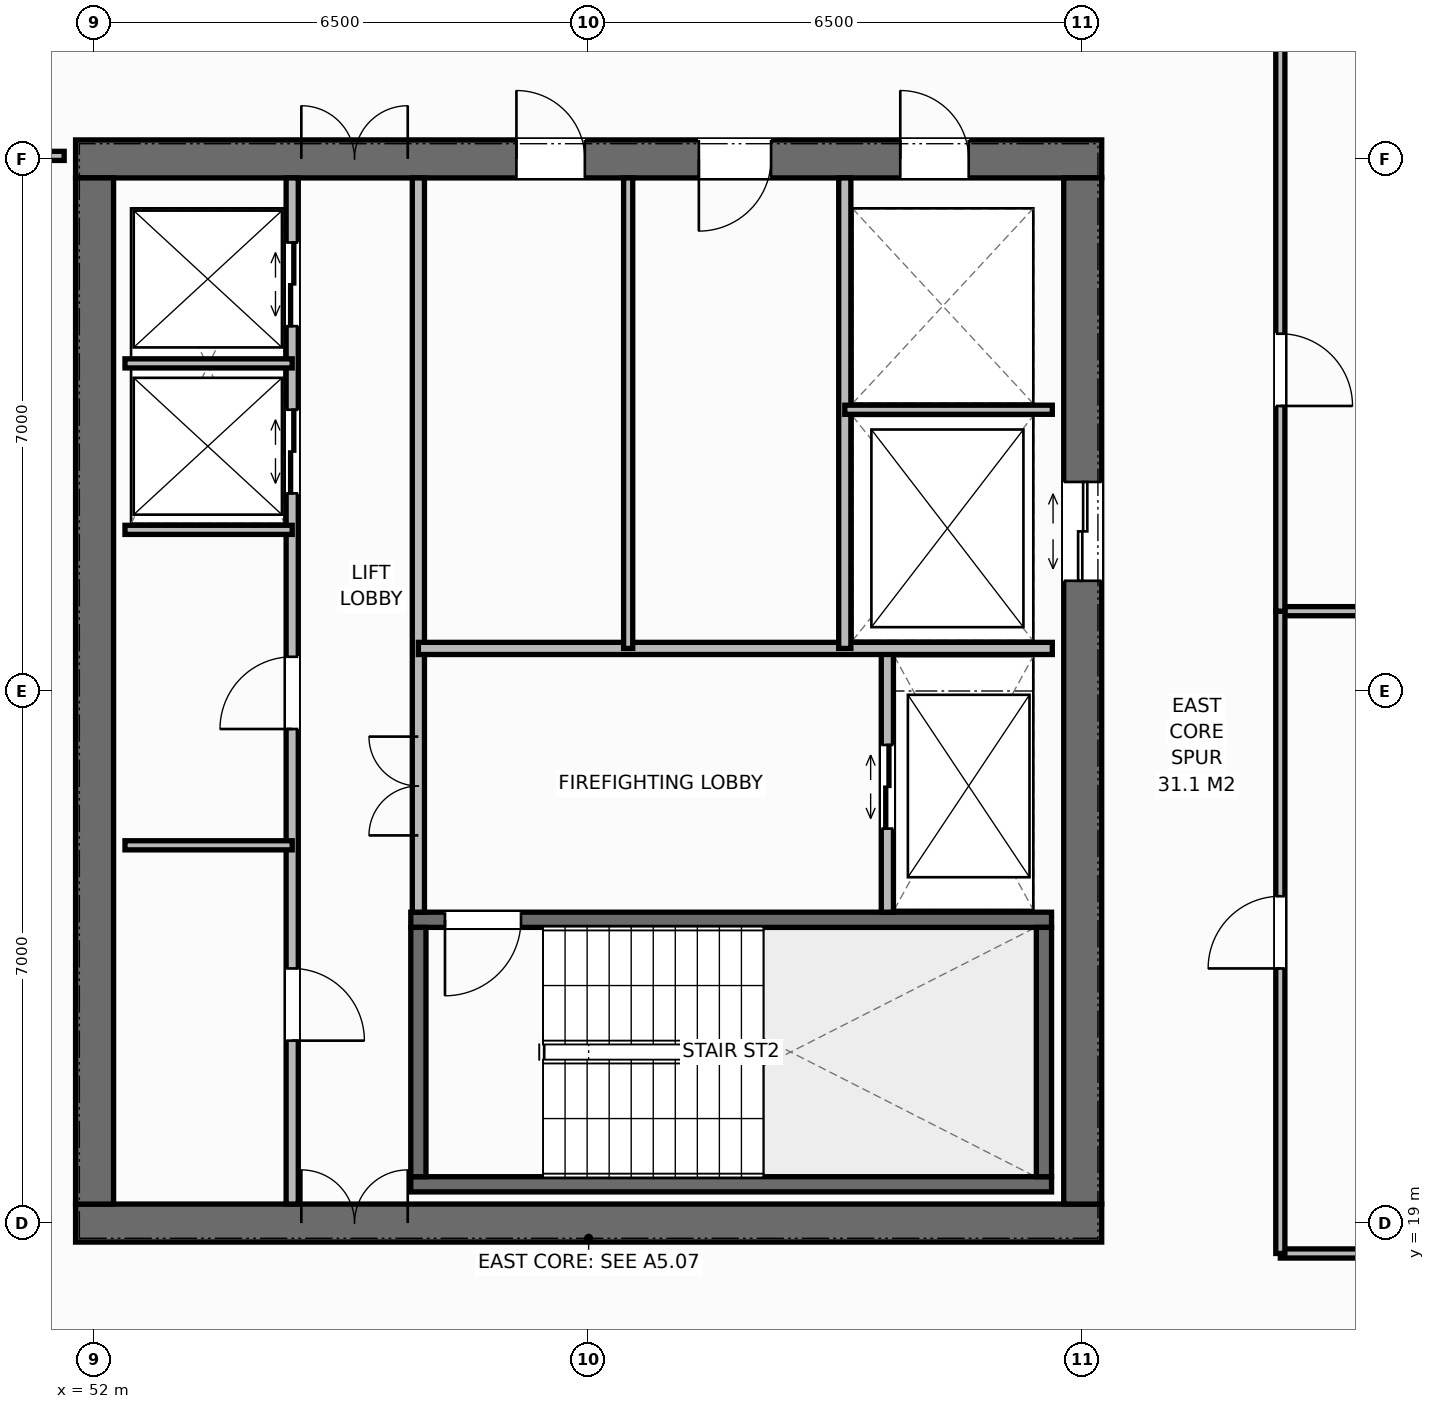
"""IFC4 building model, lengths in metres.
Left out: names, types, materials, properties, quantities, classifications, styles, units other than length and angle.
Written with IfcOpenShell. Run it as: python <this file> out.ifc"""

import sys

from ifc_helpers import new_model, si_unit, direction, frame, frame_2d, origin, place, context, subcontext, project, spatial, rectangle, extrude, element, fill, save


model = new_model("IFC4")
c1 = context("Model", 3, precision=1e-05, world=origin(), true_north=direction((0.0, 1.0)))
c2 = subcontext(c1, "Body", "Model", "MODEL_VIEW")
j1 = project(units=[si_unit("LENGTHUNIT", "METRE"), si_unit("PLANEANGLEUNIT", "RADIAN")], contexts=[c1])
p1 = place(None, origin())
s1 = spatial("IfcSite", under=j1, at=p1, CompositionType="ELEMENT")
p2 = place(p1, origin())
s2 = spatial("IfcBuilding", under=s1, at=p2, CompositionType="ELEMENT")
p3 = place(p2, frame((0.0, 0.0, 274.6)))
s3 = spatial("IfcBuildingStorey", under=s2, at=p3, CompositionType="ELEMENT", Elevation=274.6)
p4 = place(p3, frame((51.75, 19.0, 0.0), z_axis=(0.0, 0.0, 1.0), x_axis=(1.0, 0.0, 0.0)))
e1 = element("IfcWall", 1, at=p4, inside=s3, PredefinedType="SHEAR", context=c2, shape_type="SweptSolid", body=[
    extrude(rectangle(XDim=13.5, YDim=0.5, at=frame_2d((6.75, 0.0))), origin(), (0.0, 0.0, 1.0), 3.8),
])
p5 = place(p4, frame((2.97, 0.0, 0.0)))
e2 = element("IfcOpeningElement", 2, at=p5, cuts=e1, PredefinedType="OPENING", context=c2, shape_type="SweptSolid", body=[
    extrude(rectangle(XDim=1.4, YDim=2.2, at=frame_2d((0.7, 1.1))), frame((0.0, 0.26, 0.0), z_axis=(0.0, -1.0, 0.0), x_axis=(1.0, 0.0, 0.0)), (0.0, 0.0, 1.0), 0.52),
])
p6 = place(p3, frame((51.75, 33.0, 0.0), z_axis=(0.0, 0.0, 1.0), x_axis=(1.0, 0.0, 0.0)))
e3 = element("IfcWall", 3, at=p6, inside=s3, PredefinedType="SHEAR", context=c2, shape_type="SweptSolid", body=[
    extrude(rectangle(XDim=13.5, YDim=0.5, at=frame_2d((6.75, 0.0))), origin(), (0.0, 0.0, 1.0), 3.8),
])
p7 = place(p6, frame((2.97, 0.0, 0.0)))
e4 = element("IfcOpeningElement", 4, at=p7, cuts=e3, PredefinedType="OPENING", context=c2, shape_type="SweptSolid", body=[
    extrude(rectangle(XDim=1.4, YDim=2.2, at=frame_2d((0.7, 1.1))), frame((0.0, 0.26, 0.0), z_axis=(0.0, -1.0, 0.0), x_axis=(1.0, 0.0, 0.0)), (0.0, 0.0, 1.0), 0.52),
])
p8 = place(p6, frame((10.85, 0.0, 0.0)))
e5 = element("IfcOpeningElement", 5, at=p8, cuts=e3, PredefinedType="OPENING", context=c2, shape_type="SweptSolid", body=[
    extrude(rectangle(XDim=0.9, YDim=2.15, at=frame_2d((0.45, 1.075))), frame((0.0, 0.26, 0.0), z_axis=(0.0, -1.0, 0.0), x_axis=(1.0, 0.0, 0.0)), (0.0, 0.0, 1.0), 0.52),
])
p9 = place(p6, frame((5.8, 0.0, 0.0)))
e6 = element("IfcOpeningElement", 6, at=p9, cuts=e3, PredefinedType="OPENING", context=c2, shape_type="SweptSolid", body=[
    extrude(rectangle(XDim=0.9, YDim=2.15, at=frame_2d((0.45, 1.075))), frame((0.0, 0.26, 0.0), z_axis=(0.0, -1.0, 0.0), x_axis=(1.0, 0.0, 0.0)), (0.0, 0.0, 1.0), 0.52),
])
p10 = place(p6, frame((8.2, 0.0, 0.0)))
e7 = element("IfcOpeningElement", 7, at=p10, cuts=e3, PredefinedType="OPENING", context=c2, shape_type="SweptSolid", body=[
    extrude(rectangle(XDim=0.95, YDim=2.15, at=frame_2d((0.475, 1.075))), frame((0.0, 0.26, 0.0), z_axis=(0.0, -1.0, 0.0), x_axis=(1.0, 0.0, 0.0)), (0.0, 0.0, 1.0), 0.52),
])
p11 = place(p3, frame((52.0, 19.25, 0.0), z_axis=(0.0, 0.0, 1.0), x_axis=(0.0, 1.0, 0.0)))
e8 = element("IfcWall", 8, at=p11, inside=s3, PredefinedType="SHEAR", context=c2, shape_type="SweptSolid", body=[
    extrude(rectangle(XDim=13.5, YDim=0.5, at=frame_2d((6.75, 0.0))), origin(), (0.0, 0.0, 1.0), 3.8),
])
p12 = place(p3, frame((65.0, 19.25, 0.0), z_axis=(0.0, 0.0, 1.0), x_axis=(0.0, 1.0, 0.0)))
e9 = element("IfcWall", 9, at=p12, inside=s3, PredefinedType="SHEAR", context=c2, shape_type="SweptSolid", body=[
    extrude(rectangle(XDim=13.5, YDim=0.5, at=frame_2d((6.75, 0.0))), origin(), (0.0, 0.0, 1.0), 3.8),
])
p13 = place(p12, frame((8.2, 0.0, 0.0)))
e10 = element("IfcOpeningElement", 10, at=p13, cuts=e9, PredefinedType="OPENING", context=c2, shape_type="SweptSolid", body=[
    extrude(rectangle(XDim=1.3, YDim=2.2, at=frame_2d((0.65, 1.1))), frame((0.0, 0.26, 0.0), z_axis=(0.0, -1.0, 0.0), x_axis=(1.0, 0.0, 0.0)), (0.0, 0.0, 1.0), 0.52),
])
p14 = place(p3, frame((56.16, 19.51, 0.0), z_axis=(0.0, 0.0, 1.0), x_axis=(1.0, 0.0, 0.0)))
e11 = element("IfcWall", 11, at=p14, inside=s3, PredefinedType="SHEAR", context=c2, shape_type="SweptSolid", body=[
    extrude(rectangle(XDim=8.43, YDim=0.2, at=frame_2d((4.215, 0.0))), origin(), (0.0, 0.0, 1.0), 3.8),
])
p15 = place(p3, frame((56.16, 22.99, 0.0), z_axis=(0.0, 0.0, 1.0), x_axis=(1.0, 0.0, 0.0)))
e12 = element("IfcWall", 12, at=p15, inside=s3, PredefinedType="SHEAR", context=c2, shape_type="SweptSolid", body=[
    extrude(rectangle(XDim=8.43, YDim=0.2, at=frame_2d((4.215, 0.0))), origin(), (0.0, 0.0, 1.0), 3.8),
])
p16 = place(p15, frame((0.45, 0.0, 0.0)))
e13 = element("IfcOpeningElement", 13, at=p16, cuts=e12, PredefinedType="OPENING", context=c2, shape_type="SweptSolid", body=[
    extrude(rectangle(XDim=1.0, YDim=2.15, at=frame_2d((0.5, 1.075))), frame((0.0, 0.11, 0.0), z_axis=(0.0, -1.0, 0.0), x_axis=(1.0, 0.0, 0.0)), (0.0, 0.0, 1.0), 0.22),
])
for number, where, z_axis, x_axis in (
    (14, (56.26, 19.61, 0.0), (0.0, 0.0, 1.0), (0.0, 1.0, 0.0)),
    (15, (64.49, 19.61, 0.0), (0.0, 0.0, 1.0), (0.0, 1.0, 0.0)),
):
    element("IfcWall", number, at=place(p3, frame(where, z_axis=z_axis, x_axis=x_axis)), inside=s3, PredefinedType="SHEAR", context=c2, shape_type="SweptSolid", body=[
        extrude(rectangle(XDim=3.28, YDim=0.2, at=frame_2d((1.64, 0.0))), origin(), (0.0, 0.0, 1.0), 3.8),
    ])
p17 = place(p3, frame((54.6, 19.25, 0.0), z_axis=(0.0, 0.0, 1.0), x_axis=(0.0, 1.0, 0.0)))
e16 = element("IfcWall", 16, at=p17, inside=s3, PredefinedType="STANDARD", context=c2, shape_type="SweptSolid", body=[
    extrude(rectangle(XDim=13.5, YDim=0.16, at=frame_2d((6.75, 0.0))), origin(), (0.0, 0.0, 1.0), 3.588),
])
p18 = place(p17, frame((2.15, 0.0, 0.0)))
e17 = element("IfcOpeningElement", 17, at=p18, cuts=e16, PredefinedType="OPENING", context=c2, shape_type="SweptSolid", body=[
    extrude(rectangle(XDim=0.95, YDim=2.15, at=frame_2d((0.475, 1.075))), frame((0.0, 0.09, 0.0), z_axis=(0.0, -1.0, 0.0), x_axis=(1.0, 0.0, 0.0)), (0.0, 0.0, 1.0), 0.18),
])
p19 = place(p17, frame((6.25, 0.0, 0.0)))
e18 = element("IfcOpeningElement", 18, at=p19, cuts=e16, PredefinedType="OPENING", context=c2, shape_type="SweptSolid", body=[
    extrude(rectangle(XDim=0.95, YDim=2.15, at=frame_2d((0.475, 1.075))), frame((0.0, 0.09, 0.0), z_axis=(0.0, -1.0, 0.0), x_axis=(1.0, 0.0, 0.0)), (0.0, 0.0, 1.0), 0.18),
])
p20 = place(p17, frame((9.35, 0.0, 0.0)))
e19 = element("IfcOpeningElement", 19, at=p20, cuts=e16, PredefinedType="OPENING", context=c2, shape_type="SweptSolid", body=[
    extrude(rectangle(XDim=1.1, YDim=2.2, at=frame_2d((0.55, 1.1))), frame((0.0, 0.09, 0.0), z_axis=(0.0, -1.0, 0.0), x_axis=(1.0, 0.0, 0.0)), (0.0, 0.0, 1.0), 0.18),
])
p21 = place(p17, frame((11.55, 0.0, 0.0)))
e20 = element("IfcOpeningElement", 20, at=p21, cuts=e16, PredefinedType="OPENING", context=c2, shape_type="SweptSolid", body=[
    extrude(rectangle(XDim=1.1, YDim=2.2, at=frame_2d((0.55, 1.1))), frame((0.0, 0.09, 0.0), z_axis=(0.0, -1.0, 0.0), x_axis=(1.0, 0.0, 0.0)), (0.0, 0.0, 1.0), 0.18),
])
p22 = place(p3, frame((56.26, 23.09, 0.0), z_axis=(0.0, 0.0, 1.0), x_axis=(0.0, 1.0, 0.0)))
e21 = element("IfcWall", 21, at=p22, inside=s3, PredefinedType="STANDARD", context=c2, shape_type="SweptSolid", body=[
    extrude(rectangle(XDim=9.66, YDim=0.16, at=frame_2d((4.83, 0.0))), origin(), (0.0, 0.0, 1.0), 3.588),
])
p23 = place(p22, frame((1.01, 0.0, 0.0)))
e22 = element("IfcOpeningElement", 22, at=p23, cuts=e21, PredefinedType="OPENING", context=c2, shape_type="SweptSolid", body=[
    extrude(rectangle(XDim=1.3, YDim=2.2, at=frame_2d((0.65, 1.1))), frame((0.0, 0.09, 0.0), z_axis=(0.0, -1.0, 0.0), x_axis=(1.0, 0.0, 0.0)), (0.0, 0.0, 1.0), 0.18),
])
for number, where, z_axis, x_axis in (
    (23, (52.4, 23.97, 0.0), (0.0, 0.0, 1.0), (1.0, 0.0, 0.0)),
    (24, (52.4, 28.12, 0.0), (0.0, 0.0, 1.0), (1.0, 0.0, 0.0)),
    (25, (52.4, 30.31, 0.0), (0.0, 0.0, 1.0), (1.0, 0.0, 0.0)),
):
    element("IfcWall", number, at=place(p3, frame(where, z_axis=z_axis, x_axis=x_axis)), inside=s3, PredefinedType="PARTITIONING", context=c2, shape_type="SweptSolid", body=[
        extrude(rectangle(XDim=2.2, YDim=0.12, at=frame_2d((1.1, 0.0))), origin(), (0.0, 0.0, 1.0), 3.588),
    ])
p24 = place(p3, frame((62.43, 23.09, 0.0), z_axis=(0.0, 0.0, 1.0), x_axis=(0.0, 1.0, 0.0)))
e26 = element("IfcWall", 26, at=p24, inside=s3, PredefinedType="STANDARD", context=c2, shape_type="SweptSolid", body=[
    extrude(rectangle(XDim=3.47, YDim=0.16, at=frame_2d((1.735, 0.0))), origin(), (0.0, 0.0, 1.0), 3.588),
])
p25 = place(p24, frame((1.1, 0.0, 0.0)))
e27 = element("IfcOpeningElement", 27, at=p25, cuts=e26, PredefinedType="OPENING", context=c2, shape_type="SweptSolid", body=[
    extrude(rectangle(XDim=1.1, YDim=2.2, at=frame_2d((0.55, 1.1))), frame((0.0, 0.09, 0.0), z_axis=(0.0, -1.0, 0.0), x_axis=(1.0, 0.0, 0.0)), (0.0, 0.0, 1.0), 0.18),
])
p26 = place(p3, frame((56.26, 26.56, 0.0), z_axis=(0.0, 0.0, 1.0), x_axis=(1.0, 0.0, 0.0)))
e28 = element("IfcWall", 28, at=p26, inside=s3, PredefinedType="STANDARD", context=c2, shape_type="SweptSolid", body=[
    extrude(rectangle(XDim=8.34, YDim=0.16, at=frame_2d((4.17, 0.0))), origin(), (0.0, 0.0, 1.0), 3.588),
])
p27 = place(p3, frame((61.87, 26.56, 0.0), z_axis=(0.0, 0.0, 1.0), x_axis=(0.0, 1.0, 0.0)))
e29 = element("IfcWall", 29, at=p27, inside=s3, PredefinedType="STANDARD", context=c2, shape_type="SweptSolid", body=[
    extrude(rectangle(XDim=6.19, YDim=0.16, at=frame_2d((3.095, 0.0))), origin(), (0.0, 0.0, 1.0), 3.588),
])
p28 = place(p3, frame((61.87, 29.7, 0.0), z_axis=(0.0, 0.0, 1.0), x_axis=(1.0, 0.0, 0.0)))
e30 = element("IfcWall", 30, at=p28, inside=s3, PredefinedType="PARTITIONING", context=c2, shape_type="SweptSolid", body=[
    extrude(rectangle(XDim=2.73, YDim=0.12, at=frame_2d((1.365, 0.0))), origin(), (0.0, 0.0, 1.0), 3.588),
])
p29 = place(p3, frame((59.02, 26.56, 0.0), z_axis=(0.0, 0.0, 1.0), x_axis=(0.0, 1.0, 0.0)))
e31 = element("IfcWall", 31, at=p29, inside=s3, PredefinedType="PARTITIONING", context=c2, shape_type="SweptSolid", body=[
    extrude(rectangle(XDim=6.19, YDim=0.12, at=frame_2d((3.095, 0.0))), origin(), (0.0, 0.0, 1.0), 3.588),
])
p30 = place(p3, frame((48.0, 33.04, 0.0), z_axis=(0.0, 0.0, 1.0), x_axis=(1.0, 0.0, 0.0)))
e32 = element("IfcWall", 32, at=p30, inside=s3, PredefinedType="PARTITIONING", context=c2, shape_type="SweptSolid", body=[
    extrude(rectangle(XDim=3.6, YDim=0.12, at=frame_2d((1.8, 0.0))), origin(), (0.0, 0.0, 1.0), 3.328),
])
p31 = place(p30, frame((1.1, 0.0, 0.0)))
e33 = element("IfcOpeningElement", 33, at=p31, cuts=e32, PredefinedType="OPENING", context=c2, shape_type="SweptSolid", body=[
    extrude(rectangle(XDim=0.95, YDim=2.15, at=frame_2d((0.475, 1.075))), frame((0.0, 0.07, 0.0), z_axis=(0.0, -1.0, 0.0), x_axis=(1.0, 0.0, 0.0)), (0.0, 0.0, 1.0), 0.14),
])
for number, where, z_axis, x_axis in (
    (34, (67.6, 18.6, 0.0), (0.0, 0.0, 1.0), (1.0, 0.0, 0.0)),
    (35, (67.6, 27.05, 0.0), (0.0, 0.0, 1.0), (1.0, 0.0, 0.0)),
):
    element("IfcWall", number, at=place(p3, frame(where, z_axis=z_axis, x_axis=x_axis)), inside=s3, PredefinedType="PARTITIONING", context=c2, shape_type="SweptSolid", body=[
        extrude(rectangle(XDim=4.245, YDim=0.12, at=frame_2d((2.123, 0.0))), origin(), (0.0, 0.0, 1.0), 3.588),
    ])
p32 = place(p3, frame((67.6, 18.6, 0.0), z_axis=(0.0, 0.0, 1.0), x_axis=(0.0, 1.0, 0.0)))
e36 = element("IfcWall", 36, at=p32, inside=s3, PredefinedType="PARTITIONING", context=c2, shape_type="SweptSolid", body=[
    extrude(rectangle(XDim=8.45, YDim=0.12, at=frame_2d((4.225, 0.0))), origin(), (0.0, 0.0, 1.0), 3.588),
])
p33 = place(p32, frame((3.75, 0.0, 0.0)))
e37 = element("IfcOpeningElement", 37, at=p33, cuts=e36, PredefinedType="OPENING", context=c2, shape_type="SweptSolid", body=[
    extrude(rectangle(XDim=0.95, YDim=2.15, at=frame_2d((0.475, 1.075))), frame((0.0, 0.07, 0.0), z_axis=(0.0, -1.0, 0.0), x_axis=(1.0, 0.0, 0.0)), (0.0, 0.0, 1.0), 0.14),
])
p34 = place(p3, frame((67.6, 27.05, 0.0), z_axis=(0.0, 0.0, 1.0), x_axis=(0.0, 1.0, 0.0)))
e38 = element("IfcWall", 38, at=p34, inside=s3, PredefinedType="PARTITIONING", context=c2, shape_type="SweptSolid", body=[
    extrude(rectangle(XDim=8.45, YDim=0.12, at=frame_2d((4.225, 0.0))), origin(), (0.0, 0.0, 1.0), 3.588),
])
p35 = place(p34, frame((2.7, 0.0, 0.0)))
e39 = element("IfcOpeningElement", 39, at=p35, cuts=e38, PredefinedType="OPENING", context=c2, shape_type="SweptSolid", body=[
    extrude(rectangle(XDim=0.95, YDim=2.15, at=frame_2d((0.475, 1.075))), frame((0.0, 0.07, 0.0), z_axis=(0.0, -1.0, 0.0), x_axis=(1.0, 0.0, 0.0)), (0.0, 0.0, 1.0), 0.14),
])
p36 = place(p5, origin())
e40 = element("IfcDoor", 40, at=p36, inside=s3, OperationType="DOUBLE_DOOR_SINGLE_SWING", PredefinedType="DOOR", context=c2, shape_type="SweptSolid", body=[
    extrude(rectangle(XDim=1.4, YDim=2.2, at=frame_2d((0.7, 1.1))), frame((0.0, 0.075, 0.0), z_axis=(0.0, -1.0, 0.0), x_axis=(1.0, 0.0, 0.0)), (0.0, 0.0, 1.0), 0.05),
])
fill(e2, e40)
p37 = place(p7, origin())
e41 = element("IfcDoor", 41, at=p37, inside=s3, OperationType="DOUBLE_DOOR_SINGLE_SWING", PredefinedType="DOOR", context=c2, shape_type="SweptSolid", body=[
    extrude(rectangle(XDim=1.4, YDim=2.2, at=frame_2d((0.7, 1.1))), frame((0.0, -0.025, 0.0), z_axis=(0.0, -1.0, 0.0), x_axis=(1.0, 0.0, 0.0)), (0.0, 0.0, 1.0), 0.05),
])
fill(e4, e41)
p38 = place(p18, origin())
e42 = element("IfcDoor", 42, at=p38, inside=s3, OperationType="SINGLE_SWING_RIGHT", PredefinedType="DOOR", context=c2, shape_type="SweptSolid", body=[
    extrude(rectangle(XDim=0.95, YDim=2.15, at=frame_2d((0.475, 1.075))), frame((0.0, 0.025, 0.0), z_axis=(0.0, -1.0, 0.0), x_axis=(1.0, 0.0, 0.0)), (0.0, 0.0, 1.0), 0.05),
])
fill(e17, e42)
p39 = place(p19, origin())
e43 = element("IfcDoor", 43, at=p39, inside=s3, OperationType="SINGLE_SWING_LEFT", PredefinedType="DOOR", context=c2, shape_type="SweptSolid", body=[
    extrude(rectangle(XDim=0.95, YDim=2.15, at=frame_2d((0.475, 1.075))), frame((0.0, 0.025, 0.0), z_axis=(0.0, -1.0, 0.0), x_axis=(1.0, 0.0, 0.0)), (0.0, 0.0, 1.0), 0.05),
])
fill(e18, e43)
p40 = place(p20, origin())
e44 = element("IfcDoor", 44, at=p40, inside=s3, OperationType="DOUBLE_DOOR_SLIDING", PredefinedType="DOOR", context=c2, shape_type="SweptSolid", body=[
    extrude(rectangle(XDim=1.1, YDim=2.2, at=frame_2d((0.55, 1.1))), frame((0.0, 0.025, 0.0), z_axis=(0.0, -1.0, 0.0), x_axis=(1.0, 0.0, 0.0)), (0.0, 0.0, 1.0), 0.05),
])
fill(e19, e44)
p41 = place(p21, origin())
e45 = element("IfcDoor", 45, at=p41, inside=s3, OperationType="DOUBLE_DOOR_SLIDING", PredefinedType="DOOR", context=c2, shape_type="SweptSolid", body=[
    extrude(rectangle(XDim=1.1, YDim=2.2, at=frame_2d((0.55, 1.1))), frame((0.0, 0.025, 0.0), z_axis=(0.0, -1.0, 0.0), x_axis=(1.0, 0.0, 0.0)), (0.0, 0.0, 1.0), 0.05),
])
fill(e20, e45)
p42 = place(p16, origin())
e46 = element("IfcDoor", 46, at=p42, inside=s3, OperationType="SINGLE_SWING_RIGHT", PredefinedType="DOOR", context=c2, shape_type="SweptSolid", body=[
    extrude(rectangle(XDim=1.0, YDim=2.15, at=frame_2d((0.5, 1.075))), frame((0.0, 0.025, 0.0), z_axis=(0.0, -1.0, 0.0), x_axis=(1.0, 0.0, 0.0)), (0.0, 0.0, 1.0), 0.05),
])
fill(e13, e46)
p43 = place(p25, origin())
e47 = element("IfcDoor", 47, at=p43, inside=s3, OperationType="DOUBLE_DOOR_SLIDING", PredefinedType="DOOR", context=c2, shape_type="SweptSolid", body=[
    extrude(rectangle(XDim=1.1, YDim=2.2, at=frame_2d((0.55, 1.1))), frame((0.0, 0.025, 0.0), z_axis=(0.0, -1.0, 0.0), x_axis=(1.0, 0.0, 0.0)), (0.0, 0.0, 1.0), 0.05),
])
fill(e27, e47)
p44 = place(p23, origin())
e48 = element("IfcDoor", 48, at=p44, inside=s3, OperationType="DOUBLE_DOOR_SINGLE_SWING", PredefinedType="DOOR", context=c2, shape_type="SweptSolid", body=[
    extrude(rectangle(XDim=1.3, YDim=2.2, at=frame_2d((0.65, 1.1))), frame((0.0, 0.025, 0.0), z_axis=(0.0, -1.0, 0.0), x_axis=(1.0, 0.0, 0.0)), (0.0, 0.0, 1.0), 0.05),
])
fill(e22, e48)
p45 = place(p13, origin())
e49 = element("IfcDoor", 49, at=p45, inside=s3, OperationType="DOUBLE_DOOR_SLIDING", PredefinedType="DOOR", context=c2, shape_type="SweptSolid", body=[
    extrude(rectangle(XDim=1.3, YDim=2.2, at=frame_2d((0.65, 1.1))), frame((0.0, 0.025, 0.0), z_axis=(0.0, -1.0, 0.0), x_axis=(1.0, 0.0, 0.0)), (0.0, 0.0, 1.0), 0.05),
])
fill(e10, e49)
p46 = place(p8, origin())
e50 = element("IfcDoor", 50, at=p46, inside=s3, OperationType="SINGLE_SWING_LEFT", PredefinedType="DOOR", context=c2, shape_type="SweptSolid", body=[
    extrude(rectangle(XDim=0.9, YDim=2.15, at=frame_2d((0.45, 1.075))), frame((0.0, -0.025, 0.0), z_axis=(0.0, -1.0, 0.0), x_axis=(1.0, 0.0, 0.0)), (0.0, 0.0, 1.0), 0.05),
])
fill(e5, e50)
p47 = place(p9, origin())
e51 = element("IfcDoor", 51, at=p47, inside=s3, OperationType="SINGLE_SWING_LEFT", PredefinedType="DOOR", context=c2, shape_type="SweptSolid", body=[
    extrude(rectangle(XDim=0.9, YDim=2.15, at=frame_2d((0.45, 1.075))), frame((0.0, -0.025, 0.0), z_axis=(0.0, -1.0, 0.0), x_axis=(1.0, 0.0, 0.0)), (0.0, 0.0, 1.0), 0.05),
])
fill(e6, e51)
p48 = place(p10, origin())
e52 = element("IfcDoor", 52, at=p48, inside=s3, OperationType="SINGLE_SWING_RIGHT", PredefinedType="DOOR", context=c2, shape_type="SweptSolid", body=[
    extrude(rectangle(XDim=0.95, YDim=2.15, at=frame_2d((0.475, 1.075))), frame((0.0, -0.025, 0.0), z_axis=(0.0, -1.0, 0.0), x_axis=(1.0, 0.0, 0.0)), (0.0, 0.0, 1.0), 0.05),
])
fill(e7, e52)
p49 = place(p33, origin())
e53 = element("IfcDoor", 53, at=p49, inside=s3, OperationType="SINGLE_SWING_LEFT", PredefinedType="DOOR", context=c2, shape_type="SweptSolid", body=[
    extrude(rectangle(XDim=0.95, YDim=2.15, at=frame_2d((0.475, 1.075))), frame((0.0, 0.025, 0.0), z_axis=(0.0, -1.0, 0.0), x_axis=(1.0, 0.0, 0.0)), (0.0, 0.0, 1.0), 0.05),
])
fill(e37, e53)
p50 = place(p35, origin())
e54 = element("IfcDoor", 54, at=p50, inside=s3, OperationType="SINGLE_SWING_RIGHT", PredefinedType="DOOR", context=c2, shape_type="SweptSolid", body=[
    extrude(rectangle(XDim=0.95, YDim=2.15, at=frame_2d((0.475, 1.075))), frame((0.0, 0.025, 0.0), z_axis=(0.0, -1.0, 0.0), x_axis=(1.0, 0.0, 0.0)), (0.0, 0.0, 1.0), 0.05),
])
fill(e39, e54)
save(model, sys.argv[1])
